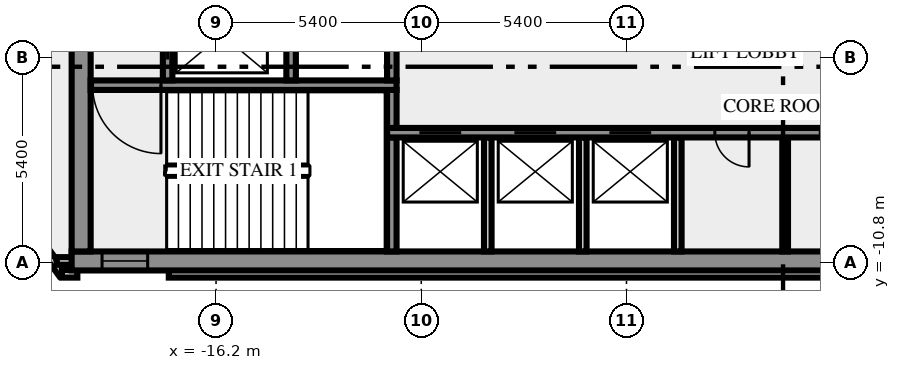
"""IFC4 building model, lengths in metres.
Left out: names, types, materials, properties, quantities, classifications, styles, units other than length and angle.
Written with IfcOpenShell. Run it as: python <this file> out.ifc"""

import sys

from ifc_helpers import new_model, si_unit, direction, frame, frame_2d, origin, place, context, subcontext, project, spatial, rectangle, extrude, element, fill, save


model = new_model("IFC4")
c1 = context("Model", 3, precision=1e-05, world=origin(), true_north=direction((0.0, 1.0)))
c2 = subcontext(c1, "Body", "Model", "MODEL_VIEW")
j1 = project(units=[si_unit("LENGTHUNIT", "METRE"), si_unit("PLANEANGLEUNIT", "RADIAN")], contexts=[c1])
p1 = place(None, origin())
s1 = spatial("IfcSite", under=j1, at=p1, CompositionType="ELEMENT")
p2 = place(p1, origin())
s2 = spatial("IfcBuilding", under=s1, at=p2, CompositionType="ELEMENT")
p3 = place(p2, frame((0.0, 0.0, 113.0)))
s3 = spatial("IfcBuildingStorey", under=s2, at=p3, CompositionType="ELEMENT", Elevation=113.0)
p4 = place(p3, frame((-21.833, -8.909, 0.0), z_axis=(0.0, 0.0, 1.0), x_axis=(0.587766567315, -0.809030569476, 0.0)))
e1 = element("IfcWall", 1, at=p4, inside=s3, PredefinedType="SOLIDWALL", context=c2, shape_type="SweptSolid", body=[
    extrude(rectangle(XDim=2.688, YDim=0.2, at=frame_2d((1.344, 0.0))), origin(), (0.0, 0.0, 1.0), 3.65),
])
p5 = place(p3, frame((-20.256, -11.088, 0.0), z_axis=(0.0, 0.0, 1.0), x_axis=(1.0, 0.0, 0.0)))
e2 = element("IfcWall", 2, at=p5, inside=s3, PredefinedType="SOLIDWALL", context=c2, shape_type="SweptSolid", body=[
    extrude(rectangle(XDim=0.406, YDim=0.2, at=frame_2d((0.203, 0.0))), origin(), (0.0, 0.0, 1.0), 3.65),
])
p6 = place(p3, frame((-17.444, -11.088, 0.0), z_axis=(0.0, 0.0, 1.0), x_axis=(1.0, 0.0, 0.0)))
e3 = element("IfcWall", 3, at=p6, inside=s3, PredefinedType="SOLIDWALL", context=c2, shape_type="SweptSolid", body=[
    extrude(rectangle(XDim=34.888, YDim=0.2, at=frame_2d((17.444, 0.0))), origin(), (0.0, 0.0, 1.0), 3.65),
])
p7 = place(p3, frame((-19.98, -10.75, 0.0), z_axis=(0.0, 0.0, 1.0), x_axis=(-1.0, 0.0, 0.0)))
e4 = element("IfcWall", 4, at=p7, inside=s3, PredefinedType="SOLIDWALL", context=c2, shape_type="SweptSolid", body=[
    extrude(rectangle(XDim=0.417, YDim=0.2, at=frame_2d((0.208, 0.0))), origin(), (0.0, 0.0, 1.0), 3.65),
])
p8 = place(p3, frame((-20.0, -10.75, 0.0), z_axis=(0.0, 0.0, 1.0), x_axis=(1.0, 0.0, 0.0)))
e5 = element("IfcWall", 5, at=p8, inside=s3, PredefinedType="SHEAR", context=c2, shape_type="SweptSolid", body=[
    extrude(rectangle(XDim=40.0, YDim=0.5, at=frame_2d((20.0, 0.0))), origin(), (0.0, 0.0, 1.0), 3.65),
])
p9 = place(p8, frame((0.8, 0.0, 1.0)))
e6 = element("IfcOpeningElement", 6, at=p9, cuts=e5, PredefinedType="OPENING", context=c2, shape_type="SweptSolid", body=[
    extrude(rectangle(XDim=1.2, YDim=1.2, at=frame_2d((0.6, 0.6))), frame((0.0, 0.26, 0.0), z_axis=(0.0, -1.0, 0.0), x_axis=(1.0, 0.0, 0.0)), (0.0, 0.0, 1.0), 0.52),
])
p10 = place(p8, frame((38.0, 0.0, 1.0)))
e7 = element("IfcOpeningElement", 7, at=p10, cuts=e5, PredefinedType="OPENING", context=c2, shape_type="SweptSolid", body=[
    extrude(rectangle(XDim=1.2, YDim=1.2, at=frame_2d((0.6, 0.6))), frame((0.0, 0.26, 0.0), z_axis=(0.0, -1.0, 0.0), x_axis=(1.0, 0.0, 0.0)), (0.0, 0.0, 1.0), 0.52),
])
p11 = place(p3, frame((-19.75, -10.5, 0.0), z_axis=(0.0, 0.0, 1.0), x_axis=(0.0, 1.0, 0.0)))
e8 = element("IfcWall", 8, at=p11, inside=s3, PredefinedType="SHEAR", context=c2, shape_type="SweptSolid", body=[
    extrude(rectangle(XDim=8.8, YDim=0.5, at=frame_2d((4.4, 0.0))), origin(), (0.0, 0.0, 1.0), 3.65),
])
p12 = place(p3, frame((-11.575, -10.5, 0.0), z_axis=(0.0, 0.0, 1.0), x_axis=(0.0, 1.0, 0.0)))
e9 = element("IfcWall", 9, at=p12, inside=s3, PredefinedType="SHEAR", context=c2, shape_type="SweptSolid", body=[
    extrude(rectangle(XDim=3.0, YDim=0.25, at=frame_2d((1.5, 0.0))), origin(), (0.0, 0.0, 1.0), 3.65),
])
for number, where, z_axis, x_axis in (
    (10, (-9.05, -10.5, 0.0), (0.0, 0.0, 1.0), (0.0, 1.0, 0.0)),
    (11, (-6.55, -10.5, 0.0), (0.0, 0.0, 1.0), (0.0, 1.0, 0.0)),
    (12, (-4.05, -10.5, 0.0), (0.0, 0.0, 1.0), (0.0, 1.0, 0.0)),
):
    element("IfcWall", number, at=place(p3, frame(where, z_axis=z_axis, x_axis=x_axis)), inside=s3, PredefinedType="SOLIDWALL", context=c2, shape_type="SweptSolid", body=[
        extrude(rectangle(XDim=3.0, YDim=0.2, at=frame_2d((1.5, 0.0))), origin(), (0.0, 0.0, 1.0), 3.65),
    ])
p13 = place(p3, frame((-1.225, -10.5, 0.0), z_axis=(0.0, 0.0, 1.0), x_axis=(0.0, 1.0, 0.0)))
e13 = element("IfcWall", 13, at=p13, inside=s3, PredefinedType="PARTITIONING", context=c2, shape_type="SweptSolid", body=[
    extrude(rectangle(XDim=3.0, YDim=0.15, at=frame_2d((1.5, 0.0))), origin(), (0.0, 0.0, 1.0), 3.65),
])
p14 = place(p3, frame((11.7, -7.375, 0.0), z_axis=(0.0, 0.0, 1.0), x_axis=(-1.0, 0.0, 0.0)))
e14 = element("IfcWall", 14, at=p14, inside=s3, PredefinedType="SHEAR", context=c2, shape_type="SweptSolid", body=[
    extrude(rectangle(XDim=23.4, YDim=0.25, at=frame_2d((11.7, 0.0))), origin(), (0.0, 0.0, 1.0), 3.65),
])
p15 = place(p14, frame((21.45, 0.0, 0.0)))
e15 = element("IfcOpeningElement", 15, at=p15, cuts=e14, PredefinedType="OPENING", context=c2, shape_type="SweptSolid", body=[
    extrude(rectangle(XDim=1.1, YDim=2.1, at=frame_2d((0.55, 1.05))), frame((0.0, 0.135, 0.0), z_axis=(0.0, -1.0, 0.0), x_axis=(1.0, 0.0, 0.0)), (0.0, 0.0, 1.0), 0.27),
])
p16 = place(p14, frame((18.95, 0.0, 0.0)))
e16 = element("IfcOpeningElement", 16, at=p16, cuts=e14, PredefinedType="OPENING", context=c2, shape_type="SweptSolid", body=[
    extrude(rectangle(XDim=1.1, YDim=2.1, at=frame_2d((0.55, 1.05))), frame((0.0, 0.135, 0.0), z_axis=(0.0, -1.0, 0.0), x_axis=(1.0, 0.0, 0.0)), (0.0, 0.0, 1.0), 0.27),
])
p17 = place(p14, frame((16.45, 0.0, 0.0)))
e17 = element("IfcOpeningElement", 17, at=p17, cuts=e14, PredefinedType="OPENING", context=c2, shape_type="SweptSolid", body=[
    extrude(rectangle(XDim=1.1, YDim=2.1, at=frame_2d((0.55, 1.05))), frame((0.0, 0.135, 0.0), z_axis=(0.0, -1.0, 0.0), x_axis=(1.0, 0.0, 0.0)), (0.0, 0.0, 1.0), 0.27),
])
p18 = place(p14, frame((13.875, 0.0, 0.0)))
e18 = element("IfcOpeningElement", 18, at=p18, cuts=e14, PredefinedType="OPENING", context=c2, shape_type="SweptSolid", body=[
    extrude(rectangle(XDim=0.9, YDim=2.1, at=frame_2d((0.45, 1.05))), frame((0.0, 0.135, 0.0), z_axis=(0.0, -1.0, 0.0), x_axis=(1.0, 0.0, 0.0)), (0.0, 0.0, 1.0), 0.27),
])
p19 = place(p14, frame((11.1, 0.0, 0.0)))
e19 = element("IfcOpeningElement", 19, at=p19, cuts=e14, PredefinedType="OPENING", context=c2, shape_type="SweptSolid", body=[
    extrude(rectangle(XDim=0.9, YDim=2.1, at=frame_2d((0.45, 1.05))), frame((0.0, 0.135, 0.0), z_axis=(0.0, -1.0, 0.0), x_axis=(1.0, 0.0, 0.0)), (0.0, 0.0, 1.0), 0.27),
])
p20 = place(p3, frame((-11.575, -7.25, 0.0), z_axis=(0.0, 0.0, 1.0), x_axis=(0.0, 1.0, 0.0)))
e20 = element("IfcWall", 20, at=p20, inside=s3, PredefinedType="SHEAR", context=c2, shape_type="SweptSolid", body=[
    extrude(rectangle(XDim=1.0, YDim=0.25, at=frame_2d((0.5, 0.0))), origin(), (0.0, 0.0, 1.0), 3.65),
])
p21 = place(p3, frame((-11.45, -6.125, 0.0), z_axis=(0.0, 0.0, 1.0), x_axis=(-1.0, 0.0, 0.0)))
e21 = element("IfcWall", 21, at=p21, inside=s3, PredefinedType="SHEAR", context=c2, shape_type="SweptSolid", body=[
    extrude(rectangle(XDim=8.05, YDim=0.25, at=frame_2d((4.025, 0.0))), origin(), (0.0, 0.0, 1.0), 3.65),
])
p22 = place(p21, frame((6.2, 0.0, 0.0)))
e22 = element("IfcOpeningElement", 22, at=p22, cuts=e21, PredefinedType="OPENING", context=c2, shape_type="SweptSolid", body=[
    extrude(rectangle(XDim=1.8, YDim=2.1, at=frame_2d((0.9, 1.05))), frame((0.0, 0.135, 0.0), z_axis=(0.0, -1.0, 0.0), x_axis=(1.0, 0.0, 0.0)), (0.0, 0.0, 1.0), 0.27),
])
p23 = place(p3, frame((-17.475, -6.0, 0.0), z_axis=(0.0, 0.0, 1.0), x_axis=(0.0, 1.0, 0.0)))
e23 = element("IfcWall", 23, at=p23, inside=s3, PredefinedType="SHEAR", context=c2, shape_type="SweptSolid", body=[
    extrude(rectangle(XDim=4.3, YDim=0.25, at=frame_2d((2.15, 0.0))), origin(), (0.0, 0.0, 1.0), 3.65),
])
p24 = place(p23, frame((0.55, 0.0, 0.0)))
e24 = element("IfcOpeningElement", 24, at=p24, cuts=e23, PredefinedType="OPENING", context=c2, shape_type="SweptSolid", body=[
    extrude(rectangle(XDim=1.3, YDim=2.1, at=frame_2d((0.65, 1.05))), frame((0.0, 0.135, 0.0), z_axis=(0.0, -1.0, 0.0), x_axis=(1.0, 0.0, 0.0)), (0.0, 0.0, 1.0), 0.27),
])
for number, where, z_axis, x_axis in (
    (25, (-14.225, -6.0, 0.0), (0.0, 0.0, 1.0), (0.0, 1.0, 0.0)),
    (26, (-11.575, -6.0, 0.0), (0.0, 0.0, 1.0), (0.0, 1.0, 0.0)),
):
    element("IfcWall", number, at=place(p3, frame(where, z_axis=z_axis, x_axis=x_axis)), inside=s3, PredefinedType="SHEAR", context=c2, shape_type="SweptSolid", body=[
        extrude(rectangle(XDim=1.75, YDim=0.25, at=frame_2d((0.875, 0.0))), origin(), (0.0, 0.0, 1.0), 3.65),
    ])
p25 = place(p9, origin())
e27 = element("IfcWindow", 27, at=p25, inside=s3, PartitioningType="SINGLE_PANEL", PredefinedType="WINDOW", context=c2, shape_type="SweptSolid", body=[
    extrude(rectangle(XDim=1.2, YDim=1.2, at=frame_2d((0.6, 0.6))), frame((0.0, 0.03, 0.0), z_axis=(0.0, -1.0, 0.0), x_axis=(1.0, 0.0, 0.0)), (0.0, 0.0, 1.0), 0.06),
])
fill(e6, e27)
p26 = place(p15, origin())
e28 = element("IfcDoor", 28, at=p26, inside=s3, OperationType="DOUBLE_DOOR_SLIDING", PredefinedType="DOOR", context=c2, shape_type="SweptSolid", body=[
    extrude(rectangle(XDim=1.1, YDim=2.1, at=frame_2d((0.55, 1.05))), frame((0.0, 0.025, 0.0), z_axis=(0.0, -1.0, 0.0), x_axis=(1.0, 0.0, 0.0)), (0.0, 0.0, 1.0), 0.05),
])
fill(e15, e28)
p27 = place(p16, origin())
e29 = element("IfcDoor", 29, at=p27, inside=s3, OperationType="DOUBLE_DOOR_SLIDING", PredefinedType="DOOR", context=c2, shape_type="SweptSolid", body=[
    extrude(rectangle(XDim=1.1, YDim=2.1, at=frame_2d((0.55, 1.05))), frame((0.0, 0.025, 0.0), z_axis=(0.0, -1.0, 0.0), x_axis=(1.0, 0.0, 0.0)), (0.0, 0.0, 1.0), 0.05),
])
fill(e16, e29)
p28 = place(p17, origin())
e30 = element("IfcDoor", 30, at=p28, inside=s3, OperationType="DOUBLE_DOOR_SLIDING", PredefinedType="DOOR", context=c2, shape_type="SweptSolid", body=[
    extrude(rectangle(XDim=1.1, YDim=2.1, at=frame_2d((0.55, 1.05))), frame((0.0, 0.025, 0.0), z_axis=(0.0, -1.0, 0.0), x_axis=(1.0, 0.0, 0.0)), (0.0, 0.0, 1.0), 0.05),
])
fill(e17, e30)
p29 = place(p18, origin())
e31 = element("IfcDoor", 31, at=p29, inside=s3, OperationType="SINGLE_SWING_RIGHT", PredefinedType="DOOR", context=c2, shape_type="SweptSolid", body=[
    extrude(rectangle(XDim=0.9, YDim=2.1, at=frame_2d((0.45, 1.05))), frame((0.0, 0.025, 0.0), z_axis=(0.0, -1.0, 0.0), x_axis=(1.0, 0.0, 0.0)), (0.0, 0.0, 1.0), 0.05),
])
fill(e18, e31)
p30 = place(p22, origin())
e32 = element("IfcDoor", 32, at=p30, inside=s3, OperationType="DOUBLE_DOOR_SINGLE_SWING", PredefinedType="DOOR", context=c2, shape_type="SweptSolid", body=[
    extrude(rectangle(XDim=1.8, YDim=2.1, at=frame_2d((0.9, 1.05))), frame((0.0, 0.025, 0.0), z_axis=(0.0, -1.0, 0.0), x_axis=(1.0, 0.0, 0.0)), (0.0, 0.0, 1.0), 0.05),
])
fill(e22, e32)
p31 = place(p24, origin())
e33 = element("IfcDoor", 33, at=p31, inside=s3, OperationType="DOUBLE_DOOR_SLIDING", PredefinedType="DOOR", context=c2, shape_type="SweptSolid", body=[
    extrude(rectangle(XDim=1.3, YDim=2.1, at=frame_2d((0.65, 1.05))), frame((0.0, 0.025, 0.0), z_axis=(0.0, -1.0, 0.0), x_axis=(1.0, 0.0, 0.0)), (0.0, 0.0, 1.0), 0.05),
])
fill(e24, e33)
save(model, sys.argv[1])
